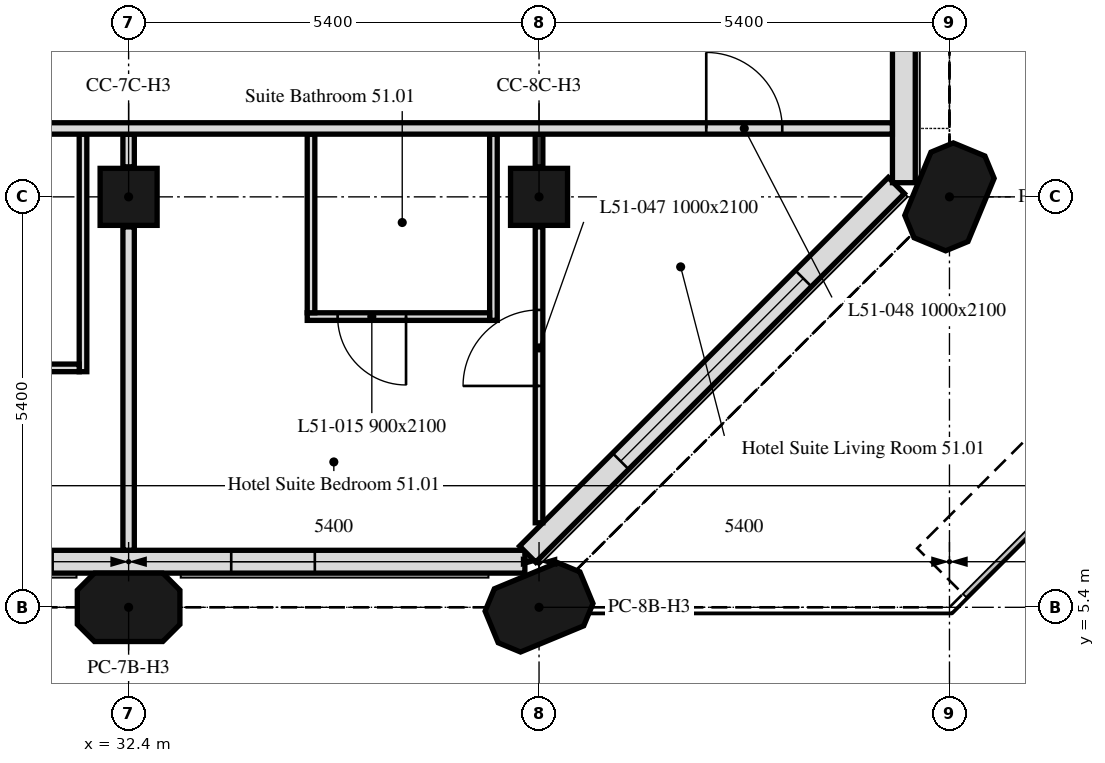
"""IFC4 building model, lengths in metres.
Left out: names, types, materials, properties, quantities, classifications, styles, units other than length and angle.
Written with IfcOpenShell. Run it as: python <this file> out.ifc"""

import sys

from ifc_helpers import new_model, si_unit, direction, frame, frame_2d, origin, origin_2d, place, context, subcontext, project, spatial, polyline, rectangle, outline, extrude, element, fill, save


model = new_model("IFC4")
c1 = context("Model", 3, precision=1e-05, world=origin(), true_north=direction((0.0, 1.0)))
c2 = subcontext(c1, "Body", "Model", "MODEL_VIEW")
j1 = project(units=[si_unit("LENGTHUNIT", "METRE"), si_unit("PLANEANGLEUNIT", "RADIAN")], contexts=[c1])
p1 = place(None, origin())
s1 = spatial("IfcSite", under=j1, at=p1, CompositionType="ELEMENT")
p2 = place(p1, origin())
s2 = spatial("IfcBuilding", under=s1, at=p2, CompositionType="ELEMENT")
p3 = place(p2, frame((0.0, 0.0, 207.1)))
s3 = spatial("IfcBuildingStorey", under=s2, at=p3, CompositionType="ELEMENT", Elevation=207.1)
for number, where, z_axis, x_axis in (
    (1, (32.4, 5.4, 0.0), (0.0, 0.0, 1.0), (1.0, 0.0, 0.0)),
    (2, (37.8, 5.4, 0.0), (0.0, 0.0, 1.0), (0.924, 0.383, 0.0)),
):
    element("IfcColumn", number, at=place(p3, frame(where, z_axis=z_axis, x_axis=x_axis)), inside=s3, PredefinedType="COLUMN", context=c2, shape_type="SweptSolid", body=[
        extrude(outline(polyline([(-0.45, -0.45), (0.45, -0.45), (0.675, -0.225), (0.675, 0.225), (0.45, 0.45), (-0.45, 0.45), (-0.675, 0.225), (-0.675, -0.225), (-0.45, -0.45)])), origin(), (0.0, 0.0, 1.0), 3.0),
    ])
for number, where, z_axis, x_axis in (
    (3, (32.4, 10.8, 0.0), (0.0, 0.0, 1.0), (1.0, 0.0, 0.0)),
    (4, (37.8, 10.8, 0.0), (0.0, 0.0, 1.0), (1.0, 0.0, 0.0)),
):
    element("IfcColumn", number, at=place(p3, frame(where, z_axis=z_axis, x_axis=x_axis)), inside=s3, PredefinedType="COLUMN", context=c2, shape_type="SweptSolid", body=[
        extrude(rectangle(XDim=0.75, YDim=0.75, at=origin_2d()), origin(), (0.0, 0.0, 1.0), 3.0),
    ])
p4 = place(p3, frame((43.2, 10.8, 0.0), z_axis=(0.0, 0.0, 1.0), x_axis=(0.382683432365, 0.923879532511, 0.0)))
e5 = element("IfcColumn", 5, at=p4, inside=s3, PredefinedType="COLUMN", context=c2, shape_type="SweptSolid", body=[
    extrude(outline(polyline([(-0.45, -0.45), (0.45, -0.45), (0.675, -0.225), (0.675, 0.225), (0.45, 0.45), (-0.45, 0.45), (-0.675, 0.225), (-0.675, -0.225), (-0.45, -0.45)])), origin(), (0.0, 0.0, 1.0), 3.0),
])
p5 = place(p3, frame((5.586, 6.0, 0.0), z_axis=(0.0, 0.0, 1.0), x_axis=(1.0, 0.0, 0.0)))
e6 = element("IfcWall", 6, at=p5, inside=s3, PredefinedType="SOLIDWALL", context=c2, shape_type="SweptSolid", body=[
    extrude(rectangle(XDim=32.027, YDim=0.3, at=frame_2d((16.014, 0.0))), origin(), (0.0, 0.0, 1.0), 3.0),
])
p6 = place(p5, frame((0.814, 0.0, 0.9)))
e7 = element("IfcOpeningElement", 7, at=p6, cuts=e6, PredefinedType="OPENING", context=c2, shape_type="SweptSolid", body=[
    extrude(rectangle(XDim=3.4, YDim=1.7, at=frame_2d((1.7, 0.85))), frame((0.0, 0.16, 0.0), z_axis=(0.0, -1.0, 0.0), x_axis=(1.0, 0.0, 0.0)), (0.0, 0.0, 1.0), 0.32),
])
p7 = place(p5, frame((6.564, 0.0, 0.9)))
e8 = element("IfcOpeningElement", 8, at=p7, cuts=e6, PredefinedType="OPENING", context=c2, shape_type="SweptSolid", body=[
    extrude(rectangle(XDim=1.1, YDim=1.7, at=frame_2d((0.55, 0.85))), frame((0.0, 0.16, 0.0), z_axis=(0.0, -1.0, 0.0), x_axis=(1.0, 0.0, 0.0)), (0.0, 0.0, 1.0), 0.32),
])
p8 = place(p5, frame((11.614, 0.0, 0.9)))
e9 = element("IfcOpeningElement", 9, at=p8, cuts=e6, PredefinedType="OPENING", context=c2, shape_type="SweptSolid", body=[
    extrude(rectangle(XDim=3.4, YDim=1.7, at=frame_2d((1.7, 0.85))), frame((0.0, 0.16, 0.0), z_axis=(0.0, -1.0, 0.0), x_axis=(1.0, 0.0, 0.0)), (0.0, 0.0, 1.0), 0.32),
])
p9 = place(p5, frame((17.364, 0.0, 0.9)))
e10 = element("IfcOpeningElement", 10, at=p9, cuts=e6, PredefinedType="OPENING", context=c2, shape_type="SweptSolid", body=[
    extrude(rectangle(XDim=1.1, YDim=1.7, at=frame_2d((0.55, 0.85))), frame((0.0, 0.16, 0.0), z_axis=(0.0, -1.0, 0.0), x_axis=(1.0, 0.0, 0.0)), (0.0, 0.0, 1.0), 0.32),
])
p10 = place(p5, frame((22.414, 0.0, 0.9)))
e11 = element("IfcOpeningElement", 11, at=p10, cuts=e6, PredefinedType="OPENING", context=c2, shape_type="SweptSolid", body=[
    extrude(rectangle(XDim=3.4, YDim=1.7, at=frame_2d((1.7, 0.85))), frame((0.0, 0.16, 0.0), z_axis=(0.0, -1.0, 0.0), x_axis=(1.0, 0.0, 0.0)), (0.0, 0.0, 1.0), 0.32),
])
p11 = place(p5, frame((28.164, 0.0, 0.9)))
e12 = element("IfcOpeningElement", 12, at=p11, cuts=e6, PredefinedType="OPENING", context=c2, shape_type="SweptSolid", body=[
    extrude(rectangle(XDim=1.1, YDim=1.7, at=frame_2d((0.55, 0.85))), frame((0.0, 0.16, 0.0), z_axis=(0.0, -1.0, 0.0), x_axis=(1.0, 0.0, 0.0)), (0.0, 0.0, 1.0), 0.32),
])
p12 = place(p3, frame((37.65, 6.099, 0.0), z_axis=(0.0, 0.0, 1.0), x_axis=(0.707106781187, 0.707106781187, 0.0)))
e13 = element("IfcWall", 13, at=p12, inside=s3, PredefinedType="SOLIDWALL", context=c2, shape_type="SweptSolid", body=[
    extrude(rectangle(XDim=6.86, YDim=0.3, at=frame_2d((3.43, 0.0))), origin(), (0.0, 0.0, 1.0), 3.0),
])
p13 = place(p12, frame((1.73, 0.0, 0.9)))
e14 = element("IfcOpeningElement", 14, at=p13, cuts=e13, PredefinedType="OPENING", context=c2, shape_type="SweptSolid", body=[
    extrude(rectangle(XDim=3.4, YDim=1.7, at=frame_2d((1.7, 0.85))), frame((0.0, 0.16, 0.0), z_axis=(0.0, -1.0, 0.0), x_axis=(1.0, 0.0, 0.0)), (0.0, 0.0, 1.0), 0.32),
])
p14 = place(p3, frame((42.6, 10.986, 0.0), z_axis=(0.0, 0.0, 1.0), x_axis=(0.0, 1.0, 0.0)))
e15 = element("IfcWall", 15, at=p14, inside=s3, PredefinedType="SOLIDWALL", context=c2, shape_type="SweptSolid", body=[
    extrude(rectangle(XDim=5.214, YDim=0.3, at=frame_2d((2.607, 0.0))), origin(), (0.0, 0.0, 1.0), 3.0),
])
p15 = place(p14, frame((3.114, 0.0, 0.0)))
e16 = element("IfcOpeningElement", 16, at=p15, cuts=e15, PredefinedType="OPENING", context=c2, shape_type="SweptSolid", body=[
    extrude(rectangle(XDim=1.2, YDim=2.4, at=frame_2d((0.6, 1.2))), frame((0.0, 0.16, 0.0), z_axis=(0.0, -1.0, 0.0), x_axis=(1.0, 0.0, 0.0)), (0.0, 0.0, 1.0), 0.32),
])
p16 = place(p3, frame((37.8, 6.512, 0.0), z_axis=(0.0, 0.0, 1.0), x_axis=(0.0, 1.0, 0.0)))
e17 = element("IfcWall", 17, at=p16, inside=s3, PredefinedType="PARTITIONING", context=c2, shape_type="SweptSolid", body=[
    extrude(rectangle(XDim=3.893, YDim=0.1, at=frame_2d((1.946, 0.0))), origin(), (0.0, 0.0, 1.0), 3.0),
])
p17 = place(p16, frame((1.8, 0.0, 0.0)))
e18 = element("IfcOpeningElement", 18, at=p17, cuts=e17, PredefinedType="OPENING", context=c2, shape_type="SweptSolid", body=[
    extrude(rectangle(XDim=1.0, YDim=2.1, at=frame_2d((0.5, 1.05))), frame((0.0, 0.05, 0.0), z_axis=(0.0, -1.0, 0.0), x_axis=(1.0, 0.0, 0.0)), (0.0, 0.0, 1.0), 0.1),
])
p18 = place(p3, frame((37.8, 11.195, 0.0), z_axis=(0.0, 0.0, 1.0), x_axis=(0.0, 1.0, 0.0)))
e19 = element("IfcWall", 19, at=p18, inside=s3, PredefinedType="PARTITIONING", context=c2, shape_type="SweptSolid", body=[
    extrude(rectangle(XDim=0.43, YDim=0.1, at=frame_2d((0.215, 0.0))), origin(), (0.0, 0.0, 1.0), 3.0),
])
p19 = place(p3, frame((37.2, 11.625, 0.0), z_axis=(0.0, 0.0, 1.0), x_axis=(0.0, -1.0, 0.0)))
e20 = element("IfcWall", 20, at=p19, inside=s3, PredefinedType="PARTITIONING", context=c2, shape_type="SweptSolid", body=[
    extrude(rectangle(XDim=2.45, YDim=0.1, at=frame_2d((1.225, 0.0))), origin(), (0.0, 0.0, 1.0), 3.0),
])
p20 = place(p3, frame((37.15, 9.225, 0.0), z_axis=(0.0, 0.0, 1.0), x_axis=(-1.0, 0.0, 0.0)))
e21 = element("IfcWall", 21, at=p20, inside=s3, PredefinedType="PARTITIONING", context=c2, shape_type="SweptSolid", body=[
    extrude(rectangle(XDim=2.4, YDim=0.1, at=frame_2d((1.2, 0.0))), origin(), (0.0, 0.0, 1.0), 3.0),
])
p21 = place(p20, frame((1.1, 0.0, 0.0)))
e22 = element("IfcOpeningElement", 22, at=p21, cuts=e21, PredefinedType="OPENING", context=c2, shape_type="SweptSolid", body=[
    extrude(rectangle(XDim=0.9, YDim=2.1, at=frame_2d((0.45, 1.05))), frame((0.0, 0.05, 0.0), z_axis=(0.0, -1.0, 0.0), x_axis=(1.0, 0.0, 0.0)), (0.0, 0.0, 1.0), 0.1),
])
p22 = place(p3, frame((34.8, 9.275, 0.0), z_axis=(0.0, 0.0, 1.0), x_axis=(0.0, 1.0, 0.0)))
e23 = element("IfcWall", 23, at=p22, inside=s3, PredefinedType="PARTITIONING", context=c2, shape_type="SweptSolid", body=[
    extrude(rectangle(XDim=2.35, YDim=0.1, at=frame_2d((1.175, 0.0))), origin(), (0.0, 0.0, 1.0), 3.0),
])
p23 = place(p3, frame((32.4, 11.625, 0.0), z_axis=(0.0, 0.0, 1.0), x_axis=(0.0, -1.0, 0.0)))
e24 = element("IfcWall", 24, at=p23, inside=s3, PredefinedType="PARTITIONING", context=c2, shape_type="SweptSolid", body=[
    extrude(rectangle(XDim=0.43, YDim=0.15, at=frame_2d((0.215, 0.0))), origin(), (0.0, 0.0, 1.0), 3.0),
])
p24 = place(p3, frame((32.4, 10.405, 0.0), z_axis=(0.0, 0.0, 1.0), x_axis=(0.0, -1.0, 0.0)))
e25 = element("IfcWall", 25, at=p24, inside=s3, PredefinedType="PARTITIONING", context=c2, shape_type="SweptSolid", body=[
    extrude(rectangle(XDim=4.254, YDim=0.15, at=frame_2d((2.127, 0.0))), origin(), (0.0, 0.0, 1.0), 3.0),
])
p25 = place(p3, frame((31.8, 11.625, 0.0), z_axis=(0.0, 0.0, 1.0), x_axis=(0.0, -1.0, 0.0)))
e26 = element("IfcWall", 26, at=p25, inside=s3, PredefinedType="PARTITIONING", context=c2, shape_type="SweptSolid", body=[
    extrude(rectangle(XDim=3.125, YDim=0.1, at=frame_2d((1.562, 0.0))), origin(), (0.0, 0.0, 1.0), 3.0),
])
p26 = place(p3, frame((31.75, 8.55, 0.0), z_axis=(0.0, 0.0, 1.0), x_axis=(-1.0, 0.0, 0.0)))
e27 = element("IfcWall", 27, at=p26, inside=s3, PredefinedType="PARTITIONING", context=c2, shape_type="SweptSolid", body=[
    extrude(rectangle(XDim=2.1, YDim=0.1, at=frame_2d((1.05, 0.0))), origin(), (0.0, 0.0, 1.0), 3.0),
])
p27 = place(p3, frame((0.751, 11.7, 0.0), z_axis=(0.0, 0.0, 1.0), x_axis=(1.0, 0.0, 0.0)))
e28 = element("IfcWall", 28, at=p27, inside=s3, PredefinedType="PARTITIONING", context=c2, shape_type="SweptSolid", body=[
    extrude(rectangle(XDim=41.698, YDim=0.15, at=frame_2d((20.849, 0.0))), origin(), (0.0, 0.0, 1.0), 3.0),
])
p28 = place(p27, frame((27.649, 0.0, 0.0)))
e29 = element("IfcOpeningElement", 29, at=p28, cuts=e28, PredefinedType="OPENING", context=c2, shape_type="SweptSolid", body=[
    extrude(rectangle(XDim=1.0, YDim=2.1, at=frame_2d((0.5, 1.05))), frame((0.0, 0.075, 0.0), z_axis=(0.0, -1.0, 0.0), x_axis=(1.0, 0.0, 0.0)), (0.0, 0.0, 1.0), 0.15),
])
p29 = place(p27, frame((22.249, 0.0, 0.0)))
e30 = element("IfcOpeningElement", 30, at=p29, cuts=e28, PredefinedType="OPENING", context=c2, shape_type="SweptSolid", body=[
    extrude(rectangle(XDim=1.0, YDim=2.1, at=frame_2d((0.5, 1.05))), frame((0.0, 0.075, 0.0), z_axis=(0.0, -1.0, 0.0), x_axis=(1.0, 0.0, 0.0)), (0.0, 0.0, 1.0), 0.15),
])
p30 = place(p27, frame((16.849, 0.0, 0.0)))
e31 = element("IfcOpeningElement", 31, at=p30, cuts=e28, PredefinedType="OPENING", context=c2, shape_type="SweptSolid", body=[
    extrude(rectangle(XDim=1.0, YDim=2.1, at=frame_2d((0.5, 1.05))), frame((0.0, 0.075, 0.0), z_axis=(0.0, -1.0, 0.0), x_axis=(1.0, 0.0, 0.0)), (0.0, 0.0, 1.0), 0.15),
])
p31 = place(p27, frame((11.449, 0.0, 0.0)))
e32 = element("IfcOpeningElement", 32, at=p31, cuts=e28, PredefinedType="OPENING", context=c2, shape_type="SweptSolid", body=[
    extrude(rectangle(XDim=1.0, YDim=2.1, at=frame_2d((0.5, 1.05))), frame((0.0, 0.075, 0.0), z_axis=(0.0, -1.0, 0.0), x_axis=(1.0, 0.0, 0.0)), (0.0, 0.0, 1.0), 0.15),
])
p32 = place(p27, frame((2.744, 0.0, 0.0)))
e33 = element("IfcOpeningElement", 33, at=p32, cuts=e28, PredefinedType="OPENING", context=c2, shape_type="SweptSolid", body=[
    extrude(rectangle(XDim=1.0, YDim=2.1, at=frame_2d((0.5, 1.05))), frame((0.0, 0.075, 0.0), z_axis=(0.0, -1.0, 0.0), x_axis=(1.0, 0.0, 0.0)), (0.0, 0.0, 1.0), 0.15),
])
p33 = place(p27, frame((39.249, 0.0, 0.0)))
e34 = element("IfcOpeningElement", 34, at=p33, cuts=e28, PredefinedType="OPENING", context=c2, shape_type="SweptSolid", body=[
    extrude(rectangle(XDim=1.0, YDim=2.1, at=frame_2d((0.5, 1.05))), frame((0.0, 0.075, 0.0), z_axis=(0.0, -1.0, 0.0), x_axis=(1.0, 0.0, 0.0)), (0.0, 0.0, 1.0), 0.15),
])
p34 = place(p11, origin())
e35 = element("IfcWindow", 35, at=p34, inside=s3, PartitioningType="SINGLE_PANEL", PredefinedType="WINDOW", context=c2, shape_type="SweptSolid", body=[
    extrude(rectangle(XDim=1.1, YDim=1.7, at=frame_2d((0.55, 0.85))), frame((0.0, 0.03, 0.0), z_axis=(0.0, -1.0, 0.0), x_axis=(1.0, 0.0, 0.0)), (0.0, 0.0, 1.0), 0.06),
])
fill(e12, e35)
p35 = place(p13, origin())
e36 = element("IfcWindow", 36, at=p35, inside=s3, PartitioningType="SINGLE_PANEL", PredefinedType="WINDOW", context=c2, shape_type="SweptSolid", body=[
    extrude(rectangle(XDim=3.4, YDim=1.7, at=frame_2d((1.7, 0.85))), frame((0.0, 0.03, 0.0), z_axis=(0.0, -1.0, 0.0), x_axis=(1.0, 0.0, 0.0)), (0.0, 0.0, 1.0), 0.06),
])
fill(e14, e36)
p36 = place(p21, origin())
e37 = element("IfcDoor", 37, at=p36, inside=s3, OperationType="SINGLE_SWING_RIGHT", PredefinedType="DOOR", context=c2, shape_type="SweptSolid", body=[
    extrude(rectangle(XDim=0.9, YDim=2.1, at=frame_2d((0.45, 1.05))), frame((0.0, 0.025, 0.0), z_axis=(0.0, -1.0, 0.0), x_axis=(1.0, 0.0, 0.0)), (0.0, 0.0, 1.0), 0.05),
])
fill(e22, e37)
p37 = place(p17, origin())
e38 = element("IfcDoor", 38, at=p37, inside=s3, OperationType="SINGLE_SWING_RIGHT", PredefinedType="DOOR", context=c2, shape_type="SweptSolid", body=[
    extrude(rectangle(XDim=1.0, YDim=2.1, at=frame_2d((0.5, 1.05))), frame((0.0, 0.025, 0.0), z_axis=(0.0, -1.0, 0.0), x_axis=(1.0, 0.0, 0.0)), (0.0, 0.0, 1.0), 0.05),
])
fill(e18, e38)
p38 = place(p33, origin())
e39 = element("IfcDoor", 39, at=p38, inside=s3, OperationType="SINGLE_SWING_LEFT", PredefinedType="DOOR", context=c2, shape_type="SweptSolid", body=[
    extrude(rectangle(XDim=1.0, YDim=2.1, at=frame_2d((0.5, 1.05))), frame((0.0, 0.025, 0.0), z_axis=(0.0, -1.0, 0.0), x_axis=(1.0, 0.0, 0.0)), (0.0, 0.0, 1.0), 0.05),
])
fill(e34, e39)
save(model, sys.argv[1])
